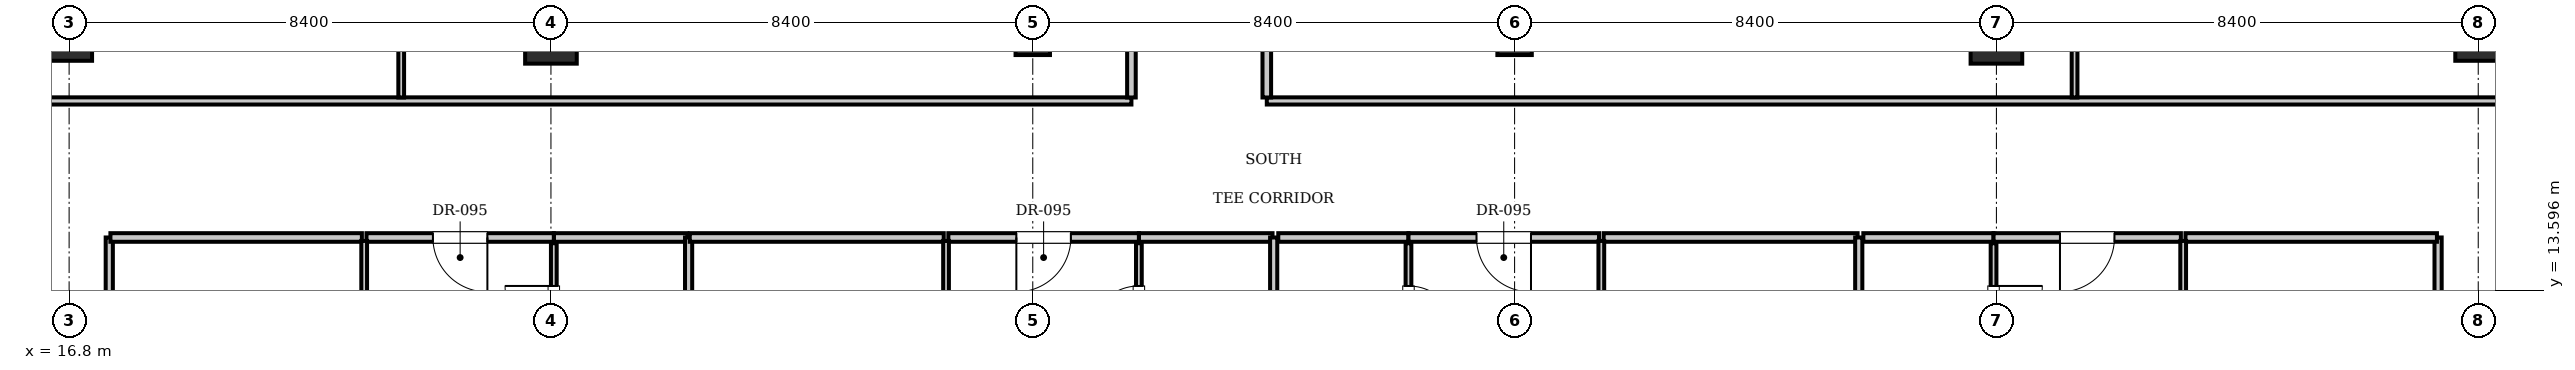
"""IFC4 building model, lengths in metres.
Left out: names, types, materials, properties, quantities, classifications, styles, units other than length and angle.
Written with IfcOpenShell. Run it as: python <this file> out.ifc"""

import sys

from ifc_helpers import new_model, si_unit, direction, frame, frame_2d, origin, origin_2d, place, context, subcontext, project, spatial, rectangle, i_section, extrude, element, fill, save


model = new_model("IFC4")
c1 = context("Model", 3, precision=1e-05, world=origin(), true_north=direction((0.0, 1.0)))
c2 = subcontext(c1, "Body", "Model", "MODEL_VIEW")
j1 = project(units=[si_unit("LENGTHUNIT", "METRE"), si_unit("PLANEANGLEUNIT", "RADIAN")], contexts=[c1])
p1 = place(None, origin())
s1 = spatial("IfcSite", under=j1, at=p1, CompositionType="ELEMENT")
p2 = place(p1, origin())
s2 = spatial("IfcBuilding", under=s1, at=p2, CompositionType="ELEMENT")
p3 = place(p2, frame((0.0, 0.0, 146.65)))
s3 = spatial("IfcBuildingStorey", under=s2, at=p3, CompositionType="ELEMENT", Elevation=146.65)
for number, where, z_axis, x_axis in (
    (1, (25.2, 18.0, 0.0), (0.0, 0.0, 1.0), (1.0, 0.0, 0.0)),
    (2, (50.4, 18.0, 0.0), (0.0, 0.0, 1.0), (1.0, 0.0, 0.0)),
):
    element("IfcColumn", number, at=place(p3, frame(where, z_axis=z_axis, x_axis=x_axis)), inside=s3, PredefinedType="COLUMN", context=c2, shape_type="SweptSolid", body=[
        extrude(rectangle(XDim=0.9, YDim=0.9, at=origin_2d()), origin(), (0.0, 0.0, 1.0), 3.85),
    ])
for number, where, z_axis, x_axis in (
    (3, (33.6, 18.0, 0.0), (0.0, 0.0, 1.0), (1.0, 0.0, 0.0)),
    (4, (42.0, 18.0, 0.0), (0.0, 0.0, 1.0), (1.0, 0.0, 0.0)),
):
    element("IfcColumn", number, at=place(p3, frame(where, z_axis=z_axis, x_axis=x_axis)), inside=s3, PredefinedType="COLUMN", context=c2, shape_type="SweptSolid", body=[
        extrude(i_section(OverallWidth=0.6, OverallDepth=0.6, WebThickness=0.025, FlangeThickness=0.038, at=origin_2d()), origin(), (0.0, 0.0, 1.0), 3.85),
    ])
for number, where, z_axis, x_axis in (
    (5, (16.8, 18.0, 0.0), (0.0, 0.0, 1.0), (1.0, 0.0, 0.0)),
    (6, (58.8, 18.0, 0.0), (0.0, 0.0, 1.0), (1.0, 0.0, 0.0)),
):
    element("IfcColumn", number, at=place(p3, frame(where, z_axis=z_axis, x_axis=x_axis)), inside=s3, PredefinedType="COLUMN", context=c2, shape_type="SweptSolid", body=[
        extrude(rectangle(XDim=0.8, YDim=0.8, at=origin_2d()), origin(), (0.0, 0.0, 1.0), 3.85),
    ])
for number, where, z_axis, x_axis in (
    (7, (17.5, 9.0, 0.0), (0.0, 0.0, 1.0), (0.0, 1.0, 0.0)),
    (8, (58.1, 9.0, 0.0), (0.0, 0.0, 1.0), (0.0, 1.0, 0.0)),
):
    element("IfcWall", number, at=place(p3, frame(where, z_axis=z_axis, x_axis=x_axis)), inside=s3, PredefinedType="PARTITIONING", context=c2, shape_type="SweptSolid", body=[
        extrude(rectangle(XDim=5.52, YDim=0.125, at=frame_2d((2.76, 0.0))), origin(), (0.0, 0.0, 1.0), 3.61),
    ])
p4 = place(p3, frame((25.25, 14.52, 0.0), z_axis=(0.0, 0.0, 1.0), x_axis=(1.0, 0.0, 0.0)))
e9 = element("IfcWall", 9, at=p4, inside=s3, PredefinedType="PARTITIONING", context=c2, shape_type="SweptSolid", body=[
    extrude(rectangle(XDim=2.33, YDim=0.15, at=frame_2d((1.165, 0.0))), origin(), (0.0, 0.0, 1.0), 3.61),
])
p5 = place(p3, frame((25.25, 12.08, 0.0), z_axis=(0.0, 0.0, 1.0), x_axis=(0.0, 1.0, 0.0)))
e10 = element("IfcWall", 10, at=p5, inside=s3, PredefinedType="PARTITIONING", context=c2, shape_type="SweptSolid", body=[
    extrude(rectangle(XDim=2.34, YDim=0.1, at=frame_2d((1.17, 0.0))), origin(), (0.0, 0.0, 1.0), 2.998),
])
p6 = place(p5, frame((0.745, 0.0, 0.0)))
e11 = element("IfcOpeningElement", 11, at=p6, cuts=e10, PredefinedType="OPENING", context=c2, shape_type="SweptSolid", body=[
    extrude(rectangle(XDim=0.85, YDim=2.1, at=frame_2d((0.425, 1.05))), frame((0.0, 0.06, 0.0), z_axis=(0.0, -1.0, 0.0), x_axis=(1.0, 0.0, 0.0)), (0.0, 0.0, 1.0), 0.12),
])
p7 = place(p3, frame((17.52, 14.52, 0.0), z_axis=(0.0, 0.0, 1.0), x_axis=(1.0, 0.0, 0.0)))
e12 = element("IfcWall", 12, at=p7, inside=s3, PredefinedType="PARTITIONING", context=c2, shape_type="SweptSolid", body=[
    extrude(rectangle(XDim=4.384, YDim=0.15, at=frame_2d((2.192, 0.0))), origin(), (0.0, 0.0, 1.0), 3.61),
])
p8 = place(p3, frame((21.984, 14.52, 0.0), z_axis=(0.0, 0.0, 1.0), x_axis=(1.0, 0.0, 0.0)))
e13 = element("IfcWall", 13, at=p8, inside=s3, PredefinedType="PARTITIONING", context=c2, shape_type="SweptSolid", body=[
    extrude(rectangle(XDim=3.266, YDim=0.15, at=frame_2d((1.633, 0.0))), origin(), (0.0, 0.0, 1.0), 3.61),
])
p9 = place(p8, frame((1.158, 0.0, 0.0)))
e14 = element("IfcOpeningElement", 14, at=p9, cuts=e13, PredefinedType="OPENING", context=c2, shape_type="SweptSolid", body=[
    extrude(rectangle(XDim=0.95, YDim=2.15, at=frame_2d((0.475, 1.075))), frame((0.0, 0.085, 0.0), z_axis=(0.0, -1.0, 0.0), x_axis=(1.0, 0.0, 0.0)), (0.0, 0.0, 1.0), 0.17),
])
p10 = place(p3, frame((21.944, 4.63, 0.0), z_axis=(0.0, 0.0, 1.0), x_axis=(0.0, 1.0, 0.0)))
e15 = element("IfcWall", 15, at=p10, inside=s3, PredefinedType="PARTITIONING", context=c2, shape_type="SweptSolid", body=[
    extrude(rectangle(XDim=9.83, YDim=0.1, at=frame_2d((4.915, 0.0))), origin(), (0.0, 0.0, 1.0), 3.61),
])
p11 = place(p10, frame((1.6, 0.0, 0.0)))
e16 = element("IfcOpeningElement", 16, at=p11, cuts=e15, PredefinedType="OPENING", context=c2, shape_type="SweptSolid", body=[
    extrude(rectangle(XDim=0.9, YDim=2.1, at=frame_2d((0.45, 1.05))), frame((0.0, 0.06, 0.0), z_axis=(0.0, -1.0, 0.0), x_axis=(1.0, 0.0, 0.0)), (0.0, 0.0, 1.0), 0.12),
])
p12 = place(p3, frame((27.6, 4.7, 0.0), z_axis=(0.0, 0.0, 1.0), x_axis=(0.0, 1.0, 0.0)))
e17 = element("IfcWall", 17, at=p12, inside=s3, PredefinedType="PARTITIONING", context=c2, shape_type="SweptSolid", body=[
    extrude(rectangle(XDim=9.82, YDim=0.125, at=frame_2d((4.91, 0.0))), origin(), (0.0, 0.0, 1.0), 3.61),
])
p13 = place(p3, frame((35.45, 14.52, 0.0), z_axis=(0.0, 0.0, 1.0), x_axis=(1.0, 0.0, 0.0)))
e18 = element("IfcWall", 18, at=p13, inside=s3, PredefinedType="PARTITIONING", context=c2, shape_type="SweptSolid", body=[
    extrude(rectangle(XDim=2.33, YDim=0.15, at=frame_2d((1.165, 0.0))), origin(), (0.0, 0.0, 1.0), 3.61),
])
p14 = place(p3, frame((35.45, 12.08, 0.0), z_axis=(0.0, 0.0, 1.0), x_axis=(0.0, 1.0, 0.0)))
e19 = element("IfcWall", 19, at=p14, inside=s3, PredefinedType="PARTITIONING", context=c2, shape_type="SweptSolid", body=[
    extrude(rectangle(XDim=2.34, YDim=0.1, at=frame_2d((1.17, 0.0))), origin(), (0.0, 0.0, 1.0), 3.61),
])
p15 = place(p14, frame((0.745, 0.0, 0.0)))
e20 = element("IfcOpeningElement", 20, at=p15, cuts=e19, PredefinedType="OPENING", context=c2, shape_type="SweptSolid", body=[
    extrude(rectangle(XDim=0.85, YDim=2.1, at=frame_2d((0.425, 1.05))), frame((0.0, 0.06, 0.0), z_axis=(0.0, -1.0, 0.0), x_axis=(1.0, 0.0, 0.0)), (0.0, 0.0, 1.0), 0.12),
])
p16 = place(p3, frame((27.62, 14.52, 0.0), z_axis=(0.0, 0.0, 1.0), x_axis=(1.0, 0.0, 0.0)))
e21 = element("IfcWall", 21, at=p16, inside=s3, PredefinedType="PARTITIONING", context=c2, shape_type="SweptSolid", body=[
    extrude(rectangle(XDim=4.428, YDim=0.15, at=frame_2d((2.214, 0.0))), origin(), (0.0, 0.0, 1.0), 3.61),
])
p17 = place(p3, frame((32.128, 14.52, 0.0), z_axis=(0.0, 0.0, 1.0), x_axis=(1.0, 0.0, 0.0)))
e22 = element("IfcWall", 22, at=p17, inside=s3, PredefinedType="PARTITIONING", context=c2, shape_type="SweptSolid", body=[
    extrude(rectangle(XDim=3.322, YDim=0.15, at=frame_2d((1.661, 0.0))), origin(), (0.0, 0.0, 1.0), 3.61),
])
p18 = place(p17, frame((1.186, 0.0, 0.0)))
e23 = element("IfcOpeningElement", 23, at=p18, cuts=e22, PredefinedType="OPENING", context=c2, shape_type="SweptSolid", body=[
    extrude(rectangle(XDim=0.95, YDim=2.15, at=frame_2d((0.475, 1.075))), frame((0.0, 0.085, 0.0), z_axis=(0.0, -1.0, 0.0), x_axis=(1.0, 0.0, 0.0)), (0.0, 0.0, 1.0), 0.17),
])
p19 = place(p3, frame((32.088, 4.63, 0.0), z_axis=(0.0, 0.0, 1.0), x_axis=(0.0, 1.0, 0.0)))
e24 = element("IfcWall", 24, at=p19, inside=s3, PredefinedType="PARTITIONING", context=c2, shape_type="SweptSolid", body=[
    extrude(rectangle(XDim=9.83, YDim=0.1, at=frame_2d((4.915, 0.0))), origin(), (0.0, 0.0, 1.0), 3.61),
])
p20 = place(p19, frame((1.6, 0.0, 0.0)))
e25 = element("IfcOpeningElement", 25, at=p20, cuts=e24, PredefinedType="OPENING", context=c2, shape_type="SweptSolid", body=[
    extrude(rectangle(XDim=0.9, YDim=2.1, at=frame_2d((0.45, 1.05))), frame((0.0, 0.06, 0.0), z_axis=(0.0, -1.0, 0.0), x_axis=(1.0, 0.0, 0.0)), (0.0, 0.0, 1.0), 0.12),
])
p21 = place(p3, frame((37.8, 4.7, 0.0), z_axis=(0.0, 0.0, 1.0), x_axis=(0.0, 1.0, 0.0)))
e26 = element("IfcWall", 26, at=p21, inside=s3, PredefinedType="PARTITIONING", context=c2, shape_type="SweptSolid", body=[
    extrude(rectangle(XDim=9.82, YDim=0.125, at=frame_2d((4.91, 0.0))), origin(), (0.0, 0.0, 1.0), 3.293),
])
p22 = place(p3, frame((37.88, 14.52, 0.0), z_axis=(0.0, 0.0, 1.0), x_axis=(1.0, 0.0, 0.0)))
e27 = element("IfcWall", 27, at=p22, inside=s3, PredefinedType="PARTITIONING", context=c2, shape_type="SweptSolid", body=[
    extrude(rectangle(XDim=2.27, YDim=0.15, at=frame_2d((1.135, 0.0))), origin(), (0.0, 0.0, 1.0), 3.61),
])
p23 = place(p3, frame((40.15, 12.08, 0.0), z_axis=(0.0, 0.0, 1.0), x_axis=(0.0, 1.0, 0.0)))
e28 = element("IfcWall", 28, at=p23, inside=s3, PredefinedType="PARTITIONING", context=c2, shape_type="SweptSolid", body=[
    extrude(rectangle(XDim=2.34, YDim=0.1, at=frame_2d((1.17, 0.0))), origin(), (0.0, 0.0, 1.0), 3.61),
])
p24 = place(p23, frame((0.745, 0.0, 0.0)))
e29 = element("IfcOpeningElement", 29, at=p24, cuts=e28, PredefinedType="OPENING", context=c2, shape_type="SweptSolid", body=[
    extrude(rectangle(XDim=0.85, YDim=2.1, at=frame_2d((0.425, 1.05))), frame((0.0, 0.06, 0.0), z_axis=(0.0, -1.0, 0.0), x_axis=(1.0, 0.0, 0.0)), (0.0, 0.0, 1.0), 0.12),
])
p25 = place(p3, frame((40.15, 14.52, 0.0), z_axis=(0.0, 0.0, 1.0), x_axis=(1.0, 0.0, 0.0)))
e30 = element("IfcWall", 30, at=p25, inside=s3, PredefinedType="PARTITIONING", context=c2, shape_type="SweptSolid", body=[
    extrude(rectangle(XDim=3.322, YDim=0.15, at=frame_2d((1.661, 0.0))), origin(), (0.0, 0.0, 1.0), 3.61),
])
p26 = place(p25, frame((1.186, 0.0, 0.0)))
e31 = element("IfcOpeningElement", 31, at=p26, cuts=e30, PredefinedType="OPENING", context=c2, shape_type="SweptSolid", body=[
    extrude(rectangle(XDim=0.95, YDim=2.15, at=frame_2d((0.475, 1.075))), frame((0.0, 0.085, 0.0), z_axis=(0.0, -1.0, 0.0), x_axis=(1.0, 0.0, 0.0)), (0.0, 0.0, 1.0), 0.17),
])
p27 = place(p3, frame((43.552, 14.52, 0.0), z_axis=(0.0, 0.0, 1.0), x_axis=(1.0, 0.0, 0.0)))
e32 = element("IfcWall", 32, at=p27, inside=s3, PredefinedType="PARTITIONING", context=c2, shape_type="SweptSolid", body=[
    extrude(rectangle(XDim=4.428, YDim=0.15, at=frame_2d((2.214, 0.0))), origin(), (0.0, 0.0, 1.0), 3.61),
])
p28 = place(p3, frame((43.512, 4.63, 0.0), z_axis=(0.0, 0.0, 1.0), x_axis=(0.0, 1.0, 0.0)))
e33 = element("IfcWall", 33, at=p28, inside=s3, PredefinedType="PARTITIONING", context=c2, shape_type="SweptSolid", body=[
    extrude(rectangle(XDim=9.83, YDim=0.1, at=frame_2d((4.915, 0.0))), origin(), (0.0, 0.0, 1.0), 3.61),
])
p29 = place(p28, frame((1.6, 0.0, 0.0)))
e34 = element("IfcOpeningElement", 34, at=p29, cuts=e33, PredefinedType="OPENING", context=c2, shape_type="SweptSolid", body=[
    extrude(rectangle(XDim=0.9, YDim=2.1, at=frame_2d((0.45, 1.05))), frame((0.0, 0.06, 0.0), z_axis=(0.0, -1.0, 0.0), x_axis=(1.0, 0.0, 0.0)), (0.0, 0.0, 1.0), 0.12),
])
p30 = place(p3, frame((48.0, 4.7, 0.0), z_axis=(0.0, 0.0, 1.0), x_axis=(0.0, 1.0, 0.0)))
e35 = element("IfcWall", 35, at=p30, inside=s3, PredefinedType="PARTITIONING", context=c2, shape_type="SweptSolid", body=[
    extrude(rectangle(XDim=9.82, YDim=0.125, at=frame_2d((4.91, 0.0))), origin(), (0.0, 0.0, 1.0), 3.61),
])
p31 = place(p3, frame((48.08, 14.52, 0.0), z_axis=(0.0, 0.0, 1.0), x_axis=(1.0, 0.0, 0.0)))
e36 = element("IfcWall", 36, at=p31, inside=s3, PredefinedType="PARTITIONING", context=c2, shape_type="SweptSolid", body=[
    extrude(rectangle(XDim=2.27, YDim=0.15, at=frame_2d((1.135, 0.0))), origin(), (0.0, 0.0, 1.0), 3.61),
])
p32 = place(p3, frame((50.35, 12.08, 0.0), z_axis=(0.0, 0.0, 1.0), x_axis=(0.0, 1.0, 0.0)))
e37 = element("IfcWall", 37, at=p32, inside=s3, PredefinedType="PARTITIONING", context=c2, shape_type="SweptSolid", body=[
    extrude(rectangle(XDim=2.34, YDim=0.1, at=frame_2d((1.17, 0.0))), origin(), (0.0, 0.0, 1.0), 2.998),
])
p33 = place(p32, frame((0.745, 0.0, 0.0)))
e38 = element("IfcOpeningElement", 38, at=p33, cuts=e37, PredefinedType="OPENING", context=c2, shape_type="SweptSolid", body=[
    extrude(rectangle(XDim=0.85, YDim=2.1, at=frame_2d((0.425, 1.05))), frame((0.0, 0.06, 0.0), z_axis=(0.0, -1.0, 0.0), x_axis=(1.0, 0.0, 0.0)), (0.0, 0.0, 1.0), 0.12),
])
p34 = place(p3, frame((50.35, 14.52, 0.0), z_axis=(0.0, 0.0, 1.0), x_axis=(1.0, 0.0, 0.0)))
e39 = element("IfcWall", 39, at=p34, inside=s3, PredefinedType="PARTITIONING", context=c2, shape_type="SweptSolid", body=[
    extrude(rectangle(XDim=3.266, YDim=0.15, at=frame_2d((1.633, 0.0))), origin(), (0.0, 0.0, 1.0), 3.61),
])
p35 = place(p34, frame((1.158, 0.0, 0.0)))
e40 = element("IfcOpeningElement", 40, at=p35, cuts=e39, PredefinedType="OPENING", context=c2, shape_type="SweptSolid", body=[
    extrude(rectangle(XDim=0.95, YDim=2.15, at=frame_2d((0.475, 1.075))), frame((0.0, 0.085, 0.0), z_axis=(0.0, -1.0, 0.0), x_axis=(1.0, 0.0, 0.0)), (0.0, 0.0, 1.0), 0.17),
])
p36 = place(p3, frame((53.696, 14.52, 0.0), z_axis=(0.0, 0.0, 1.0), x_axis=(1.0, 0.0, 0.0)))
e41 = element("IfcWall", 41, at=p36, inside=s3, PredefinedType="PARTITIONING", context=c2, shape_type="SweptSolid", body=[
    extrude(rectangle(XDim=4.384, YDim=0.15, at=frame_2d((2.192, 0.0))), origin(), (0.0, 0.0, 1.0), 3.61),
])
p37 = place(p3, frame((53.656, 4.63, 0.0), z_axis=(0.0, 0.0, 1.0), x_axis=(0.0, 1.0, 0.0)))
e42 = element("IfcWall", 42, at=p37, inside=s3, PredefinedType="PARTITIONING", context=c2, shape_type="SweptSolid", body=[
    extrude(rectangle(XDim=9.83, YDim=0.1, at=frame_2d((4.915, 0.0))), origin(), (0.0, 0.0, 1.0), 3.61),
])
p38 = place(p37, frame((1.6, 0.0, 0.0)))
e43 = element("IfcOpeningElement", 43, at=p38, cuts=e42, PredefinedType="OPENING", context=c2, shape_type="SweptSolid", body=[
    extrude(rectangle(XDim=0.9, YDim=2.1, at=frame_2d((0.45, 1.05))), frame((0.0, 0.06, 0.0), z_axis=(0.0, -1.0, 0.0), x_axis=(1.0, 0.0, 0.0)), (0.0, 0.0, 1.0), 0.12),
])
p39 = place(p3, frame((13.2, 16.9, 0.0), z_axis=(0.0, 0.0, 1.0), x_axis=(1.0, 0.0, 0.0)))
e44 = element("IfcWall", 44, at=p39, inside=s3, PredefinedType="PARTITIONING", context=c2, shape_type="SweptSolid", body=[
    extrude(rectangle(XDim=22.12, YDim=0.125, at=frame_2d((11.06, 0.0))), origin(), (0.0, 0.0, 1.0), 3.61),
])
p40 = place(p3, frame((37.68, 16.9, 0.0), z_axis=(0.0, 0.0, 1.0), x_axis=(1.0, 0.0, 0.0)))
e45 = element("IfcWall", 45, at=p40, inside=s3, PredefinedType="PARTITIONING", context=c2, shape_type="SweptSolid", body=[
    extrude(rectangle(XDim=24.72, YDim=0.125, at=frame_2d((12.36, 0.0))), origin(), (0.0, 0.0, 1.0), 3.61),
])
p41 = place(p3, frame((35.32, 16.96, 0.0), z_axis=(0.0, 0.0, 1.0), x_axis=(0.0, 1.0, 0.0)))
e46 = element("IfcWall", 46, at=p41, inside=s3, PredefinedType="PARTITIONING", context=c2, shape_type="SweptSolid", body=[
    extrude(rectangle(XDim=2.72, YDim=0.15, at=frame_2d((1.36, 0.0))), origin(), (0.0, 0.0, 1.0), 3.61),
])
p42 = place(p41, frame((0.885, 0.0, 0.0)))
e47 = element("IfcOpeningElement", 47, at=p42, cuts=e46, PredefinedType="OPENING", context=c2, shape_type="SweptSolid", body=[
    extrude(rectangle(XDim=0.95, YDim=2.15, at=frame_2d((0.475, 1.075))), frame((0.0, 0.085, 0.0), z_axis=(0.0, -1.0, 0.0), x_axis=(1.0, 0.0, 0.0)), (0.0, 0.0, 1.0), 0.17),
])
p43 = place(p3, frame((22.59, 16.96, 0.0), z_axis=(0.0, 0.0, 1.0), x_axis=(0.0, 1.0, 0.0)))
e48 = element("IfcWall", 48, at=p43, inside=s3, PredefinedType="PARTITIONING", context=c2, shape_type="SweptSolid", body=[
    extrude(rectangle(XDim=4.61, YDim=0.1, at=frame_2d((2.305, 0.0))), origin(), (0.0, 0.0, 1.0), 3.61),
])
p44 = place(p43, frame((1.855, 0.0, 0.0)))
e49 = element("IfcOpeningElement", 49, at=p44, cuts=e48, PredefinedType="OPENING", context=c2, shape_type="SweptSolid", body=[
    extrude(rectangle(XDim=0.9, YDim=2.1, at=frame_2d((0.45, 1.05))), frame((0.0, 0.06, 0.0), z_axis=(0.0, -1.0, 0.0), x_axis=(1.0, 0.0, 0.0)), (0.0, 0.0, 1.0), 0.12),
])
p45 = place(p3, frame((37.68, 16.96, 0.0), z_axis=(0.0, 0.0, 1.0), x_axis=(0.0, 1.0, 0.0)))
e50 = element("IfcWall", 50, at=p45, inside=s3, PredefinedType="PARTITIONING", context=c2, shape_type="SweptSolid", body=[
    extrude(rectangle(XDim=2.72, YDim=0.15, at=frame_2d((1.36, 0.0))), origin(), (0.0, 0.0, 1.0), 3.293),
])
p46 = place(p45, frame((0.885, 0.0, 0.0)))
e51 = element("IfcOpeningElement", 51, at=p46, cuts=e50, PredefinedType="OPENING", context=c2, shape_type="SweptSolid", body=[
    extrude(rectangle(XDim=0.95, YDim=2.15, at=frame_2d((0.475, 1.075))), frame((0.0, 0.085, 0.0), z_axis=(0.0, -1.0, 0.0), x_axis=(1.0, 0.0, 0.0)), (0.0, 0.0, 1.0), 0.17),
])
p47 = place(p3, frame((51.762, 16.96, 0.0), z_axis=(0.0, 0.0, 1.0), x_axis=(0.0, 1.0, 0.0)))
e52 = element("IfcWall", 52, at=p47, inside=s3, PredefinedType="PARTITIONING", context=c2, shape_type="SweptSolid", body=[
    extrude(rectangle(XDim=4.61, YDim=0.1, at=frame_2d((2.305, 0.0))), origin(), (0.0, 0.0, 1.0), 3.61),
])
p48 = place(p47, frame((1.855, 0.0, 0.0)))
e53 = element("IfcOpeningElement", 53, at=p48, cuts=e52, PredefinedType="OPENING", context=c2, shape_type="SweptSolid", body=[
    extrude(rectangle(XDim=0.9, YDim=2.1, at=frame_2d((0.45, 1.05))), frame((0.0, 0.06, 0.0), z_axis=(0.0, -1.0, 0.0), x_axis=(1.0, 0.0, 0.0)), (0.0, 0.0, 1.0), 0.12),
])
p49 = place(p6, origin())
e54 = element("IfcDoor", 54, at=p49, inside=s3, OperationType="SINGLE_SWING_RIGHT", PredefinedType="DOOR", context=c2, shape_type="SweptSolid", body=[
    extrude(rectangle(XDim=0.85, YDim=2.1, at=frame_2d((0.425, 1.05))), frame((0.0, 0.025, 0.0), z_axis=(0.0, -1.0, 0.0), x_axis=(1.0, 0.0, 0.0)), (0.0, 0.0, 1.0), 0.05),
])
fill(e11, e54)
p50 = place(p9, frame((0.95, 0.0, 0.0), z_axis=(0.0, 0.0, 1.0), x_axis=(-1.0, 0.0, 0.0)))
e55 = element("IfcDoor", 55, at=p50, inside=s3, OperationType="SINGLE_SWING_LEFT", PredefinedType="DOOR", context=c2, shape_type="SweptSolid", body=[
    extrude(rectangle(XDim=0.95, YDim=2.15, at=frame_2d((0.475, 1.075))), frame((0.0, 0.025, 0.0), z_axis=(0.0, -1.0, 0.0), x_axis=(1.0, 0.0, 0.0)), (0.0, 0.0, 1.0), 0.05),
])
fill(e14, e55)
p51 = place(p15, origin())
e56 = element("IfcDoor", 56, at=p51, inside=s3, OperationType="SINGLE_SWING_LEFT", PredefinedType="DOOR", context=c2, shape_type="SweptSolid", body=[
    extrude(rectangle(XDim=0.85, YDim=2.1, at=frame_2d((0.425, 1.05))), frame((0.0, 0.025, 0.0), z_axis=(0.0, -1.0, 0.0), x_axis=(1.0, 0.0, 0.0)), (0.0, 0.0, 1.0), 0.05),
])
fill(e20, e56)
p52 = place(p18, frame((0.95, 0.0, 0.0), z_axis=(0.0, 0.0, 1.0), x_axis=(-1.0, 0.0, 0.0)))
e57 = element("IfcDoor", 57, at=p52, inside=s3, OperationType="SINGLE_SWING_RIGHT", PredefinedType="DOOR", context=c2, shape_type="SweptSolid", body=[
    extrude(rectangle(XDim=0.95, YDim=2.15, at=frame_2d((0.475, 1.075))), frame((0.0, 0.025, 0.0), z_axis=(0.0, -1.0, 0.0), x_axis=(1.0, 0.0, 0.0)), (0.0, 0.0, 1.0), 0.05),
])
fill(e23, e57)
p53 = place(p24, frame((0.85, 0.0, 0.0), z_axis=(0.0, 0.0, 1.0), x_axis=(-1.0, 0.0, 0.0)))
e58 = element("IfcDoor", 58, at=p53, inside=s3, OperationType="SINGLE_SWING_RIGHT", PredefinedType="DOOR", context=c2, shape_type="SweptSolid", body=[
    extrude(rectangle(XDim=0.85, YDim=2.1, at=frame_2d((0.425, 1.05))), frame((0.0, 0.025, 0.0), z_axis=(0.0, -1.0, 0.0), x_axis=(1.0, 0.0, 0.0)), (0.0, 0.0, 1.0), 0.05),
])
fill(e29, e58)
p54 = place(p26, frame((0.95, 0.0, 0.0), z_axis=(0.0, 0.0, 1.0), x_axis=(-1.0, 0.0, 0.0)))
e59 = element("IfcDoor", 59, at=p54, inside=s3, OperationType="SINGLE_SWING_LEFT", PredefinedType="DOOR", context=c2, shape_type="SweptSolid", body=[
    extrude(rectangle(XDim=0.95, YDim=2.15, at=frame_2d((0.475, 1.075))), frame((0.0, 0.025, 0.0), z_axis=(0.0, -1.0, 0.0), x_axis=(1.0, 0.0, 0.0)), (0.0, 0.0, 1.0), 0.05),
])
fill(e31, e59)
p55 = place(p33, frame((0.85, 0.0, 0.0), z_axis=(0.0, 0.0, 1.0), x_axis=(-1.0, 0.0, 0.0)))
e60 = element("IfcDoor", 60, at=p55, inside=s3, OperationType="SINGLE_SWING_LEFT", PredefinedType="DOOR", context=c2, shape_type="SweptSolid", body=[
    extrude(rectangle(XDim=0.85, YDim=2.1, at=frame_2d((0.425, 1.05))), frame((0.0, 0.025, 0.0), z_axis=(0.0, -1.0, 0.0), x_axis=(1.0, 0.0, 0.0)), (0.0, 0.0, 1.0), 0.05),
])
fill(e38, e60)
p56 = place(p35, frame((0.95, 0.0, 0.0), z_axis=(0.0, 0.0, 1.0), x_axis=(-1.0, 0.0, 0.0)))
e61 = element("IfcDoor", 61, at=p56, inside=s3, OperationType="SINGLE_SWING_RIGHT", PredefinedType="DOOR", context=c2, shape_type="SweptSolid", body=[
    extrude(rectangle(XDim=0.95, YDim=2.15, at=frame_2d((0.475, 1.075))), frame((0.0, 0.025, 0.0), z_axis=(0.0, -1.0, 0.0), x_axis=(1.0, 0.0, 0.0)), (0.0, 0.0, 1.0), 0.05),
])
fill(e40, e61)
save(model, sys.argv[1])
